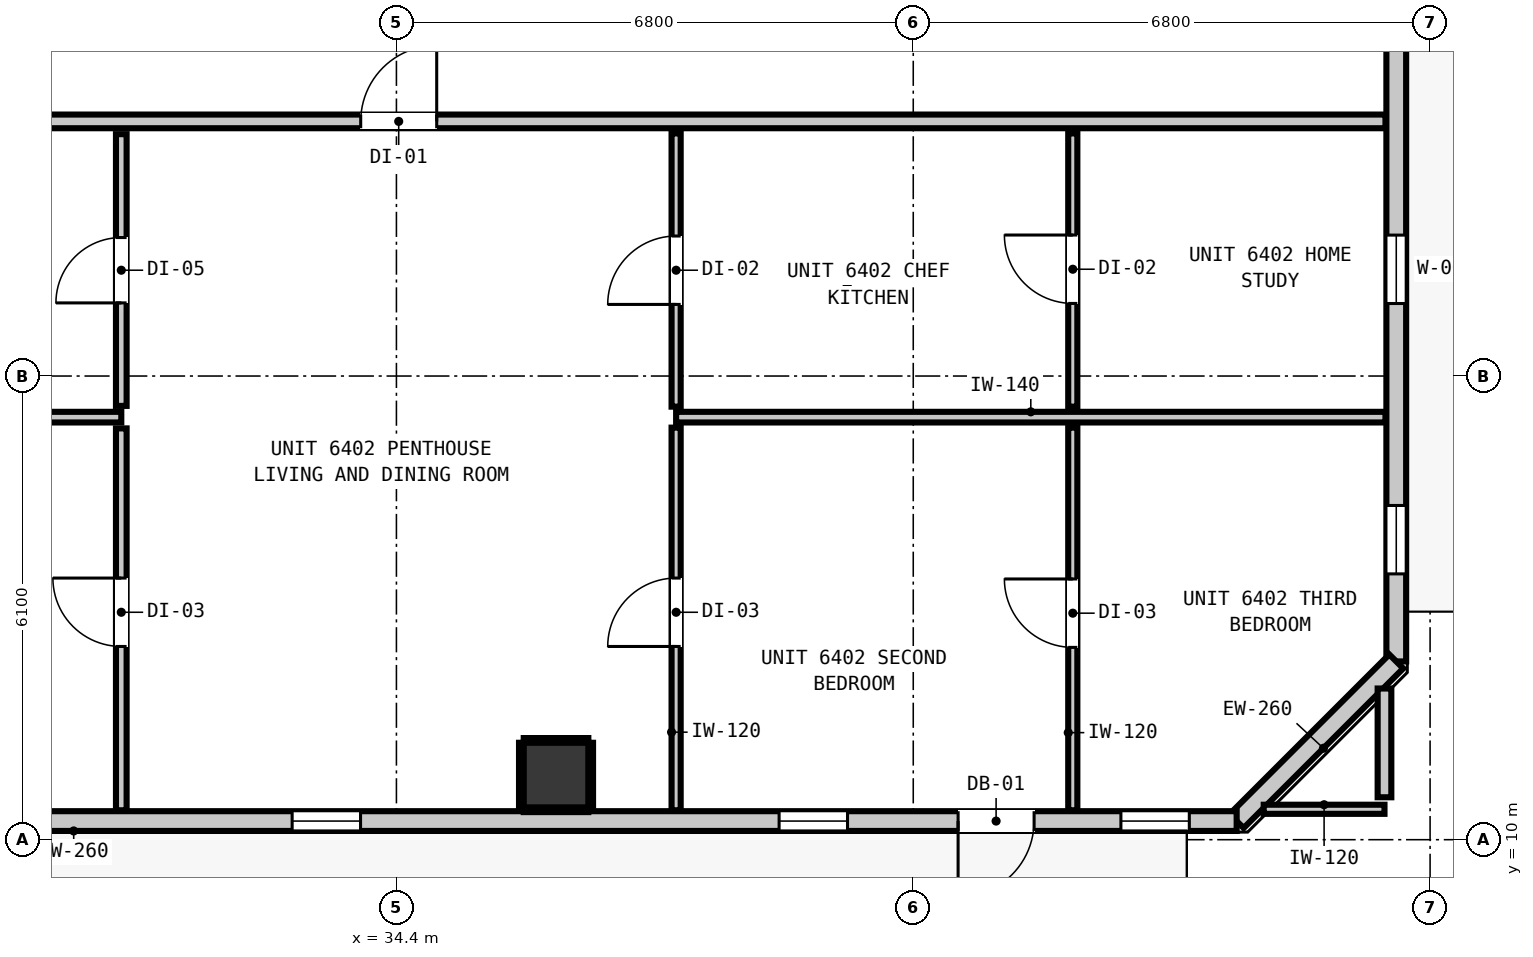
"""IFC4 building model, lengths in metres.
Left out: names, types, materials, properties, quantities, classifications, styles, units other than length and angle.
Written with IfcOpenShell. Run it as: python <this file> out.ifc"""

import sys

from ifc_helpers import new_model, si_unit, direction, frame, frame_2d, origin, origin_2d, place, context, subcontext, project, spatial, rectangle, extrude, element, fill, save


model = new_model("IFC4")
c1 = context("Model", 3, precision=1e-05, world=origin(), true_north=direction((0.0, 1.0)))
c2 = subcontext(c1, "Body", "Model", "MODEL_VIEW")
j1 = project(units=[si_unit("LENGTHUNIT", "METRE"), si_unit("PLANEANGLEUNIT", "RADIAN")], contexts=[c1])
p1 = place(None, origin())
s1 = spatial("IfcSite", under=j1, at=p1, CompositionType="ELEMENT")
p2 = place(p1, origin())
s2 = spatial("IfcBuilding", under=s1, at=p2, CompositionType="ELEMENT")
p3 = place(p2, frame((0.0, 0.0, 220.04)))
s3 = spatial("IfcBuildingStorey", under=s2, at=p3, CompositionType="ELEMENT", Elevation=220.04)
p4 = place(p3, frame((36.5, 10.85, 0.0), z_axis=(0.0, 0.0, 1.0), x_axis=(1.0, 0.0, 0.0)))
e1 = element("IfcColumn", 1, at=p4, inside=s3, PredefinedType="COLUMN", context=c2, shape_type="SweptSolid", body=[
    extrude(rectangle(XDim=0.85, YDim=0.85, at=origin_2d()), origin(), (0.0, 0.0, 1.0), 3.32),
])
p5 = place(p3, frame((47.555, 42.655, 0.0), z_axis=(0.0, 0.0, 1.0), x_axis=(0.0, -1.0, 0.0)))
e2 = element("IfcWall", 2, at=p5, inside=s3, PredefinedType="STANDARD", context=c2, shape_type="SweptSolid", body=[
    extrude(rectangle(XDim=30.31, YDim=0.26, at=frame_2d((15.155, 0.0))), origin(), (0.0, 0.0, 1.0), 3.1),
])
p6 = place(p5, frame((4.082, 0.0, 0.0)))
e3 = element("IfcOpeningElement", 3, at=p6, cuts=e2, PredefinedType="OPENING", context=c2, shape_type="SweptSolid", body=[
    extrude(rectangle(XDim=1.0, YDim=2.15, at=frame_2d((0.5, 1.075))), frame((0.0, 0.14, 0.0), z_axis=(0.0, -1.0, 0.0), x_axis=(1.0, 0.0, 0.0)), (0.0, 0.0, 1.0), 0.28),
])
p7 = place(p5, frame((24.701, 0.0, 0.85)))
e4 = element("IfcOpeningElement", 4, at=p7, cuts=e2, PredefinedType="OPENING", context=c2, shape_type="SweptSolid", body=[
    extrude(rectangle(XDim=0.9, YDim=1.5, at=frame_2d((0.45, 0.75))), frame((0.0, 0.14, 0.0), z_axis=(0.0, -1.0, 0.0), x_axis=(1.0, 0.0, 0.0)), (0.0, 0.0, 1.0), 0.28),
])
p8 = place(p5, frame((28.258, 0.0, 0.85)))
e5 = element("IfcOpeningElement", 5, at=p8, cuts=e2, PredefinedType="OPENING", context=c2, shape_type="SweptSolid", body=[
    extrude(rectangle(XDim=0.9, YDim=1.5, at=frame_2d((0.45, 0.75))), frame((0.0, 0.14, 0.0), z_axis=(0.0, -1.0, 0.0), x_axis=(1.0, 0.0, 0.0)), (0.0, 0.0, 1.0), 0.28),
])
p9 = place(p5, frame((15.855, 0.0, 0.85)))
e6 = element("IfcOpeningElement", 6, at=p9, cuts=e2, PredefinedType="OPENING", context=c2, shape_type="SweptSolid", body=[
    extrude(rectangle(XDim=0.9, YDim=1.5, at=frame_2d((0.45, 0.75))), frame((0.0, 0.14, 0.0), z_axis=(0.0, -1.0, 0.0), x_axis=(1.0, 0.0, 0.0)), (0.0, 0.0, 1.0), 0.28),
])
p10 = place(p3, frame((47.555, 12.345, 0.0), z_axis=(0.0, 0.0, 1.0), x_axis=(-0.707106781187, -0.707106781187, 0.0)))
e7 = element("IfcWall", 7, at=p10, inside=s3, PredefinedType="STANDARD", context=c2, shape_type="SweptSolid", body=[
    extrude(rectangle(XDim=2.97, YDim=0.26, at=frame_2d((1.485, 0.0))), origin(), (0.0, 0.0, 1.0), 3.1),
])
p11 = place(p3, frame((45.455, 10.245, 0.0), z_axis=(0.0, 0.0, 1.0), x_axis=(-1.0, 0.0, 0.0)))
e8 = element("IfcWall", 8, at=p11, inside=s3, PredefinedType="STANDARD", context=c2, shape_type="SweptSolid", body=[
    extrude(rectangle(XDim=32.71, YDim=0.26, at=frame_2d((16.355, 0.0))), origin(), (0.0, 0.0, 1.0), 3.1),
])
p12 = place(p11, frame((2.665, 0.0, 0.0)))
e9 = element("IfcOpeningElement", 9, at=p12, cuts=e8, PredefinedType="OPENING", context=c2, shape_type="SweptSolid", body=[
    extrude(rectangle(XDim=1.0, YDim=2.15, at=frame_2d((0.5, 1.075))), frame((0.0, 0.14, 0.0), z_axis=(0.0, -1.0, 0.0), x_axis=(1.0, 0.0, 0.0)), (0.0, 0.0, 1.0), 0.28),
])
p13 = place(p11, frame((27.897, 0.0, 0.85)))
e10 = element("IfcOpeningElement", 10, at=p13, cuts=e8, PredefinedType="OPENING", context=c2, shape_type="SweptSolid", body=[
    extrude(rectangle(XDim=0.9, YDim=1.5, at=frame_2d((0.45, 0.75))), frame((0.0, 0.14, 0.0), z_axis=(0.0, -1.0, 0.0), x_axis=(1.0, 0.0, 0.0)), (0.0, 0.0, 1.0), 0.28),
])
p14 = place(p11, frame((30.805, 0.0, 0.85)))
e11 = element("IfcOpeningElement", 11, at=p14, cuts=e8, PredefinedType="OPENING", context=c2, shape_type="SweptSolid", body=[
    extrude(rectangle(XDim=0.58, YDim=1.5, at=frame_2d((0.29, 0.75))), frame((0.0, 0.14, 0.0), z_axis=(0.0, -1.0, 0.0), x_axis=(1.0, 0.0, 0.0)), (0.0, 0.0, 1.0), 0.28),
])
p15 = place(p11, frame((22.05, 0.0, 0.85)))
e12 = element("IfcOpeningElement", 12, at=p15, cuts=e8, PredefinedType="OPENING", context=c2, shape_type="SweptSolid", body=[
    extrude(rectangle(XDim=0.9, YDim=1.5, at=frame_2d((0.45, 0.75))), frame((0.0, 0.14, 0.0), z_axis=(0.0, -1.0, 0.0), x_axis=(1.0, 0.0, 0.0)), (0.0, 0.0, 1.0), 0.28),
])
p16 = place(p11, frame((11.527, 0.0, 0.85)))
e13 = element("IfcOpeningElement", 13, at=p16, cuts=e8, PredefinedType="OPENING", context=c2, shape_type="SweptSolid", body=[
    extrude(rectangle(XDim=0.9, YDim=1.5, at=frame_2d((0.45, 0.75))), frame((0.0, 0.14, 0.0), z_axis=(0.0, -1.0, 0.0), x_axis=(1.0, 0.0, 0.0)), (0.0, 0.0, 1.0), 0.28),
])
p17 = place(p11, frame((18.175, 0.0, 0.85)))
e14 = element("IfcOpeningElement", 14, at=p17, cuts=e8, PredefinedType="OPENING", context=c2, shape_type="SweptSolid", body=[
    extrude(rectangle(XDim=0.9, YDim=1.5, at=frame_2d((0.45, 0.75))), frame((0.0, 0.14, 0.0), z_axis=(0.0, -1.0, 0.0), x_axis=(1.0, 0.0, 0.0)), (0.0, 0.0, 1.0), 0.28),
])
p18 = place(p11, frame((5.12, 0.0, 0.85)))
e15 = element("IfcOpeningElement", 15, at=p18, cuts=e8, PredefinedType="OPENING", context=c2, shape_type="SweptSolid", body=[
    extrude(rectangle(XDim=0.9, YDim=1.5, at=frame_2d((0.45, 0.75))), frame((0.0, 0.14, 0.0), z_axis=(0.0, -1.0, 0.0), x_axis=(1.0, 0.0, 0.0)), (0.0, 0.0, 1.0), 0.28),
])
p19 = place(p11, frame((0.623, 0.0, 0.85)))
e16 = element("IfcOpeningElement", 16, at=p19, cuts=e8, PredefinedType="OPENING", context=c2, shape_type="SweptSolid", body=[
    extrude(rectangle(XDim=0.9, YDim=1.5, at=frame_2d((0.45, 0.75))), frame((0.0, 0.14, 0.0), z_axis=(0.0, -1.0, 0.0), x_axis=(1.0, 0.0, 0.0)), (0.0, 0.0, 1.0), 0.28),
])
p20 = place(p3, frame((10.787, 19.45, 0.0), z_axis=(0.0, 0.0, 1.0), x_axis=(1.0, 0.0, 0.0)))
e17 = element("IfcWall", 17, at=p20, inside=s3, PredefinedType="PARTITIONING", context=c2, shape_type="SweptSolid", body=[
    extrude(rectangle(XDim=36.626, YDim=0.18, at=frame_2d((18.313, 0.0))), origin(), (0.0, 0.0, 1.0), 3.1),
])
p21 = place(p20, frame((5.82, 0.0, 0.0)))
e18 = element("IfcOpeningElement", 18, at=p21, cuts=e17, PredefinedType="OPENING", context=c2, shape_type="SweptSolid", body=[
    extrude(rectangle(XDim=1.0, YDim=2.15, at=frame_2d((0.5, 1.075))), frame((0.0, 0.1, 0.0), z_axis=(0.0, -1.0, 0.0), x_axis=(1.0, 0.0, 0.0)), (0.0, 0.0, 1.0), 0.2),
])
p22 = place(p20, frame((23.143, 0.0, 0.0)))
e19 = element("IfcOpeningElement", 19, at=p22, cuts=e17, PredefinedType="OPENING", context=c2, shape_type="SweptSolid", body=[
    extrude(rectangle(XDim=1.0, YDim=2.15, at=frame_2d((0.5, 1.075))), frame((0.0, 0.1, 0.0), z_axis=(0.0, -1.0, 0.0), x_axis=(1.0, 0.0, 0.0)), (0.0, 0.0, 1.0), 0.2),
])
p23 = place(p3, frame((19.22, 15.559, 0.0), z_axis=(0.0, 0.0, 1.0), x_axis=(1.0, 0.0, 0.0)))
e20 = element("IfcWall", 20, at=p23, inside=s3, PredefinedType="PARTITIONING", context=c2, shape_type="SweptSolid", body=[
    extrude(rectangle(XDim=11.56, YDim=0.14, at=frame_2d((5.78, 0.0))), origin(), (0.0, 0.0, 1.0), 3.1),
])
p24 = place(p3, frame((38.08, 15.559, 0.0), z_axis=(0.0, 0.0, 1.0), x_axis=(1.0, 0.0, 0.0)))
e21 = element("IfcWall", 21, at=p24, inside=s3, PredefinedType="PARTITIONING", context=c2, shape_type="SweptSolid", body=[
    extrude(rectangle(XDim=9.333, YDim=0.14, at=frame_2d((4.667, 0.0))), origin(), (0.0, 0.0, 1.0), 3.1),
])
p25 = place(p3, frame((45.811, 10.4, 0.0), z_axis=(0.0, 0.0, 1.0), x_axis=(1.0, 0.0, 0.0)))
e22 = element("IfcWall", 22, at=p25, inside=s3, PredefinedType="PARTITIONING", context=c2, shape_type="SweptSolid", body=[
    extrude(rectangle(XDim=1.589, YDim=0.12, at=frame_2d((0.794, 0.0))), origin(), (0.0, 0.0, 1.0), 3.1),
])
p26 = place(p3, frame((47.4, 10.558, 0.0), z_axis=(0.0, 0.0, 1.0), x_axis=(0.0, 1.0, 0.0)))
e23 = element("IfcWall", 23, at=p26, inside=s3, PredefinedType="PARTITIONING", context=c2, shape_type="SweptSolid", body=[
    extrude(rectangle(XDim=1.431, YDim=0.18, at=frame_2d((0.715, 0.0))), origin(), (0.0, 0.0, 1.0), 3.1),
])
p27 = place(p3, frame((30.78, 10.387, 0.0), z_axis=(0.0, 0.0, 1.0), x_axis=(0.0, 1.0, 0.0)))
e24 = element("IfcWall", 24, at=p27, inside=s3, PredefinedType="PARTITIONING", context=c2, shape_type="SweptSolid", body=[
    extrude(rectangle(XDim=5.024, YDim=0.14, at=frame_2d((2.512, 0.0))), origin(), (0.0, 0.0, 1.0), 3.1),
])
p28 = place(p27, frame((2.155, 0.0, 0.0)))
e25 = element("IfcOpeningElement", 25, at=p28, cuts=e24, PredefinedType="OPENING", context=c2, shape_type="SweptSolid", body=[
    extrude(rectangle(XDim=0.9, YDim=2.1, at=frame_2d((0.45, 1.05))), frame((0.0, 0.08, 0.0), z_axis=(0.0, -1.0, 0.0), x_axis=(1.0, 0.0, 0.0)), (0.0, 0.0, 1.0), 0.16),
])
p29 = place(p3, frame((30.78, 15.707, 0.0), z_axis=(0.0, 0.0, 1.0), x_axis=(0.0, 1.0, 0.0)))
e26 = element("IfcWall", 26, at=p29, inside=s3, PredefinedType="PARTITIONING", context=c2, shape_type="SweptSolid", body=[
    extrude(rectangle(XDim=3.575, YDim=0.14, at=frame_2d((1.788, 0.0))), origin(), (0.0, 0.0, 1.0), 3.1),
])
p30 = place(p29, frame((1.355, 0.0, 0.0)))
e27 = element("IfcOpeningElement", 27, at=p30, cuts=e26, PredefinedType="OPENING", context=c2, shape_type="SweptSolid", body=[
    extrude(rectangle(XDim=0.86, YDim=2.02, at=frame_2d((0.43, 1.01))), frame((0.0, 0.08, 0.0), z_axis=(0.0, -1.0, 0.0), x_axis=(1.0, 0.0, 0.0)), (0.0, 0.0, 1.0), 0.16),
])
p31 = place(p3, frame((38.08, 10.387, 0.0), z_axis=(0.0, 0.0, 1.0), x_axis=(0.0, 1.0, 0.0)))
e28 = element("IfcWall", 28, at=p31, inside=s3, PredefinedType="PARTITIONING", context=c2, shape_type="SweptSolid", body=[
    extrude(rectangle(XDim=5.034, YDim=0.12, at=frame_2d((2.517, 0.0))), origin(), (0.0, 0.0, 1.0), 3.1),
])
p32 = place(p31, frame((2.155, 0.0, 0.0)))
e29 = element("IfcOpeningElement", 29, at=p32, cuts=e28, PredefinedType="OPENING", context=c2, shape_type="SweptSolid", body=[
    extrude(rectangle(XDim=0.9, YDim=2.1, at=frame_2d((0.45, 1.05))), frame((0.0, 0.07, 0.0), z_axis=(0.0, -1.0, 0.0), x_axis=(1.0, 0.0, 0.0)), (0.0, 0.0, 1.0), 0.14),
])
p33 = place(p3, frame((38.08, 15.697, 0.0), z_axis=(0.0, 0.0, 1.0), x_axis=(0.0, 1.0, 0.0)))
e30 = element("IfcWall", 30, at=p33, inside=s3, PredefinedType="PARTITIONING", context=c2, shape_type="SweptSolid", body=[
    extrude(rectangle(XDim=3.595, YDim=0.12, at=frame_2d((1.797, 0.0))), origin(), (0.0, 0.0, 1.0), 3.1),
])
p34 = place(p33, frame((1.345, 0.0, 0.0)))
e31 = element("IfcOpeningElement", 31, at=p34, cuts=e30, PredefinedType="OPENING", context=c2, shape_type="SweptSolid", body=[
    extrude(rectangle(XDim=0.9, YDim=2.1, at=frame_2d((0.45, 1.05))), frame((0.0, 0.07, 0.0), z_axis=(0.0, -1.0, 0.0), x_axis=(1.0, 0.0, 0.0)), (0.0, 0.0, 1.0), 0.14),
])
p35 = place(p3, frame((43.299, 10.387, 0.0), z_axis=(0.0, 0.0, 1.0), x_axis=(0.0, 1.0, 0.0)))
e32 = element("IfcWall", 32, at=p35, inside=s3, PredefinedType="PARTITIONING", context=c2, shape_type="SweptSolid", body=[
    extrude(rectangle(XDim=5.034, YDim=0.12, at=frame_2d((2.517, 0.0))), origin(), (0.0, 0.0, 1.0), 3.1),
])
p36 = place(p35, frame((2.143, 0.0, 0.0)))
e33 = element("IfcOpeningElement", 33, at=p36, cuts=e32, PredefinedType="OPENING", context=c2, shape_type="SweptSolid", body=[
    extrude(rectangle(XDim=0.9, YDim=2.1, at=frame_2d((0.45, 1.05))), frame((0.0, 0.07, 0.0), z_axis=(0.0, -1.0, 0.0), x_axis=(1.0, 0.0, 0.0)), (0.0, 0.0, 1.0), 0.14),
])
p37 = place(p3, frame((43.299, 15.697, 0.0), z_axis=(0.0, 0.0, 1.0), x_axis=(0.0, 1.0, 0.0)))
e34 = element("IfcWall", 34, at=p37, inside=s3, PredefinedType="PARTITIONING", context=c2, shape_type="SweptSolid", body=[
    extrude(rectangle(XDim=3.595, YDim=0.12, at=frame_2d((1.797, 0.0))), origin(), (0.0, 0.0, 1.0), 3.1),
])
p38 = place(p37, frame((1.358, 0.0, 0.0)))
e35 = element("IfcOpeningElement", 35, at=p38, cuts=e34, PredefinedType="OPENING", context=c2, shape_type="SweptSolid", body=[
    extrude(rectangle(XDim=0.9, YDim=2.1, at=frame_2d((0.45, 1.05))), frame((0.0, 0.07, 0.0), z_axis=(0.0, -1.0, 0.0), x_axis=(1.0, 0.0, 0.0)), (0.0, 0.0, 1.0), 0.14),
])
for number, where, z_axis, x_axis in (
    (36, (36.075, 10.393, 0.0), (0.0, 0.0, 1.0), (1.0, 0.0, 0.0)),
    (37, (36.075, 11.307, 0.0), (0.0, 0.0, 1.0), (1.0, 0.0, 0.0)),
):
    element("IfcWall", number, at=place(p3, frame(where, z_axis=z_axis, x_axis=x_axis)), inside=s3, PredefinedType="PARTITIONING", context=c2, shape_type="SweptSolid", body=[
        extrude(rectangle(XDim=0.85, YDim=0.06, at=frame_2d((0.425, 0.0))), origin(), (0.0, 0.0, 1.0), 1.45),
    ])
for number, where, z_axis, x_axis in (
    (38, (36.043, 10.425, 0.0), (0.0, 0.0, 1.0), (0.0, 1.0, 0.0)),
    (39, (36.957, 10.425, 0.0), (0.0, 0.0, 1.0), (0.0, 1.0, 0.0)),
):
    element("IfcWall", number, at=place(p3, frame(where, z_axis=z_axis, x_axis=x_axis)), inside=s3, PredefinedType="PARTITIONING", context=c2, shape_type="SweptSolid", body=[
        extrude(rectangle(XDim=0.85, YDim=0.06, at=frame_2d((0.425, 0.0))), origin(), (0.0, 0.0, 1.0), 1.45),
    ])
p39 = place(p12, origin())
e40 = element("IfcDoor", 40, at=p39, inside=s3, OperationType="SINGLE_SWING_RIGHT", PredefinedType="DOOR", context=c2, shape_type="SweptSolid", body=[
    extrude(rectangle(XDim=1.0, YDim=2.15, at=frame_2d((0.5, 1.075))), frame((0.0, 0.025, 0.0), z_axis=(0.0, -1.0, 0.0), x_axis=(1.0, 0.0, 0.0)), (0.0, 0.0, 1.0), 0.05),
])
fill(e9, e40)
p40 = place(p7, origin())
e41 = element("IfcWindow", 41, at=p40, inside=s3, PartitioningType="SINGLE_PANEL", PredefinedType="WINDOW", context=c2, shape_type="SweptSolid", body=[
    extrude(rectangle(XDim=0.9, YDim=1.5, at=frame_2d((0.45, 0.75))), frame((0.0, 0.03, 0.0), z_axis=(0.0, -1.0, 0.0), x_axis=(1.0, 0.0, 0.0)), (0.0, 0.0, 1.0), 0.06),
])
fill(e4, e41)
p41 = place(p8, origin())
e42 = element("IfcWindow", 42, at=p41, inside=s3, PartitioningType="SINGLE_PANEL", PredefinedType="WINDOW", context=c2, shape_type="SweptSolid", body=[
    extrude(rectangle(XDim=0.9, YDim=1.5, at=frame_2d((0.45, 0.75))), frame((0.0, 0.03, 0.0), z_axis=(0.0, -1.0, 0.0), x_axis=(1.0, 0.0, 0.0)), (0.0, 0.0, 1.0), 0.06),
])
fill(e5, e42)
p42 = place(p16, origin())
e43 = element("IfcWindow", 43, at=p42, inside=s3, PartitioningType="SINGLE_PANEL", PredefinedType="WINDOW", context=c2, shape_type="SweptSolid", body=[
    extrude(rectangle(XDim=0.9, YDim=1.5, at=frame_2d((0.45, 0.75))), frame((0.0, 0.03, 0.0), z_axis=(0.0, -1.0, 0.0), x_axis=(1.0, 0.0, 0.0)), (0.0, 0.0, 1.0), 0.06),
])
fill(e13, e43)
p43 = place(p18, origin())
e44 = element("IfcWindow", 44, at=p43, inside=s3, PartitioningType="SINGLE_PANEL", PredefinedType="WINDOW", context=c2, shape_type="SweptSolid", body=[
    extrude(rectangle(XDim=0.9, YDim=1.5, at=frame_2d((0.45, 0.75))), frame((0.0, 0.03, 0.0), z_axis=(0.0, -1.0, 0.0), x_axis=(1.0, 0.0, 0.0)), (0.0, 0.0, 1.0), 0.06),
])
fill(e15, e44)
p44 = place(p19, origin())
e45 = element("IfcWindow", 45, at=p44, inside=s3, PartitioningType="SINGLE_PANEL", PredefinedType="WINDOW", context=c2, shape_type="SweptSolid", body=[
    extrude(rectangle(XDim=0.9, YDim=1.5, at=frame_2d((0.45, 0.75))), frame((0.0, 0.03, 0.0), z_axis=(0.0, -1.0, 0.0), x_axis=(1.0, 0.0, 0.0)), (0.0, 0.0, 1.0), 0.06),
])
fill(e16, e45)
p45 = place(p22, origin())
e46 = element("IfcDoor", 46, at=p45, inside=s3, OperationType="SINGLE_SWING_RIGHT", PredefinedType="DOOR", context=c2, shape_type="SweptSolid", body=[
    extrude(rectangle(XDim=1.0, YDim=2.15, at=frame_2d((0.5, 1.075))), frame((0.0, 0.025, 0.0), z_axis=(0.0, -1.0, 0.0), x_axis=(1.0, 0.0, 0.0)), (0.0, 0.0, 1.0), 0.05),
])
fill(e19, e46)
p46 = place(p30, origin())
e47 = element("IfcDoor", 47, at=p46, inside=s3, OperationType="SINGLE_SWING_LEFT", PredefinedType="DOOR", context=c2, shape_type="SweptSolid", body=[
    extrude(rectangle(XDim=0.86, YDim=2.02, at=frame_2d((0.43, 1.01))), frame((0.0, 0.025, 0.0), z_axis=(0.0, -1.0, 0.0), x_axis=(1.0, 0.0, 0.0)), (0.0, 0.0, 1.0), 0.05),
])
fill(e27, e47)
p47 = place(p28, origin())
e48 = element("IfcDoor", 48, at=p47, inside=s3, OperationType="SINGLE_SWING_RIGHT", PredefinedType="DOOR", context=c2, shape_type="SweptSolid", body=[
    extrude(rectangle(XDim=0.9, YDim=2.1, at=frame_2d((0.45, 1.05))), frame((0.0, 0.025, 0.0), z_axis=(0.0, -1.0, 0.0), x_axis=(1.0, 0.0, 0.0)), (0.0, 0.0, 1.0), 0.05),
])
fill(e25, e48)
p48 = place(p34, origin())
e49 = element("IfcDoor", 49, at=p48, inside=s3, OperationType="SINGLE_SWING_LEFT", PredefinedType="DOOR", context=c2, shape_type="SweptSolid", body=[
    extrude(rectangle(XDim=0.9, YDim=2.1, at=frame_2d((0.45, 1.05))), frame((0.0, 0.025, 0.0), z_axis=(0.0, -1.0, 0.0), x_axis=(1.0, 0.0, 0.0)), (0.0, 0.0, 1.0), 0.05),
])
fill(e31, e49)
p49 = place(p38, origin())
e50 = element("IfcDoor", 50, at=p49, inside=s3, OperationType="SINGLE_SWING_RIGHT", PredefinedType="DOOR", context=c2, shape_type="SweptSolid", body=[
    extrude(rectangle(XDim=0.9, YDim=2.1, at=frame_2d((0.45, 1.05))), frame((0.0, 0.025, 0.0), z_axis=(0.0, -1.0, 0.0), x_axis=(1.0, 0.0, 0.0)), (0.0, 0.0, 1.0), 0.05),
])
fill(e35, e50)
p50 = place(p32, origin())
e51 = element("IfcDoor", 51, at=p50, inside=s3, OperationType="SINGLE_SWING_LEFT", PredefinedType="DOOR", context=c2, shape_type="SweptSolid", body=[
    extrude(rectangle(XDim=0.9, YDim=2.1, at=frame_2d((0.45, 1.05))), frame((0.0, 0.025, 0.0), z_axis=(0.0, -1.0, 0.0), x_axis=(1.0, 0.0, 0.0)), (0.0, 0.0, 1.0), 0.05),
])
fill(e29, e51)
p51 = place(p36, origin())
e52 = element("IfcDoor", 52, at=p51, inside=s3, OperationType="SINGLE_SWING_RIGHT", PredefinedType="DOOR", context=c2, shape_type="SweptSolid", body=[
    extrude(rectangle(XDim=0.9, YDim=2.1, at=frame_2d((0.45, 1.05))), frame((0.0, 0.025, 0.0), z_axis=(0.0, -1.0, 0.0), x_axis=(1.0, 0.0, 0.0)), (0.0, 0.0, 1.0), 0.05),
])
fill(e33, e52)
save(model, sys.argv[1])
